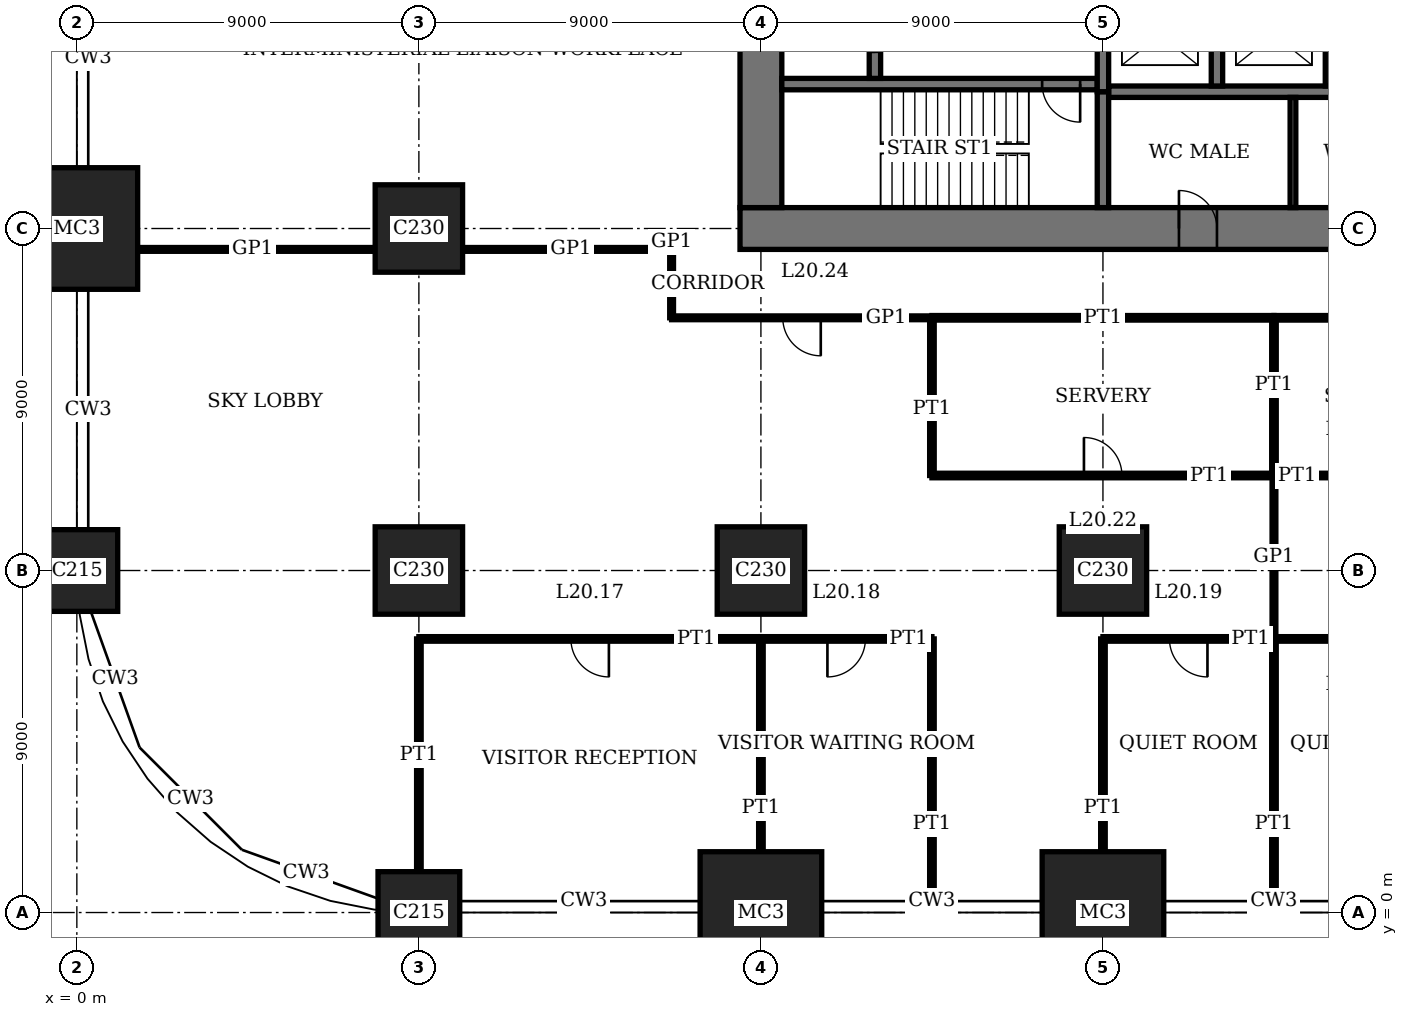
"""IFC4 building model, lengths in metres.
Left out: names, types, materials, properties, quantities, classifications, styles, units other than length and angle.
Written with IfcOpenShell. Run it as: python <this file> out.ifc"""

import sys

from ifc_helpers import new_model, si_unit, direction, frame, frame_2d, origin, origin_2d, place, context, subcontext, project, spatial, rectangle, extrude, element, fill, save


model = new_model("IFC4")
c1 = context("Model", 3, precision=1e-05, world=origin(), true_north=direction((0.0, 1.0)))
c2 = subcontext(c1, "Body", "Model", "MODEL_VIEW")
j1 = project(units=[si_unit("LENGTHUNIT", "METRE"), si_unit("PLANEANGLEUNIT", "RADIAN")], contexts=[c1])
p1 = place(None, origin())
s1 = spatial("IfcSite", under=j1, at=p1, CompositionType="ELEMENT")
p2 = place(p1, origin())
s2 = spatial("IfcBuilding", under=s1, at=p2, CompositionType="ELEMENT")
p3 = place(p2, frame((0.0, 0.0, 85.0)))
s3 = spatial("IfcBuildingStorey", under=s2, at=p3, CompositionType="ELEMENT", Elevation=85.0)
p4 = place(p3, frame((0.0, 9.0, 0.0), z_axis=(0.0, 0.0, 1.0), x_axis=(1.0, 0.0, 0.0)))
e1 = element("IfcColumn", 1, at=p4, inside=s3, PredefinedType="COLUMN", context=c2, shape_type="SweptSolid", body=[
    extrude(rectangle(XDim=2.15, YDim=2.15, at=origin_2d()), origin(), (0.0, 0.0, 1.0), 4.0),
])
p5 = place(p3, frame((0.0, 18.0, 0.0), z_axis=(0.0, 0.0, 1.0), x_axis=(1.0, 0.0, 0.0)))
e2 = element("IfcColumn", 2, at=p5, inside=s3, PredefinedType="COLUMN", context=c2, shape_type="SweptSolid", body=[
    extrude(rectangle(XDim=3.2, YDim=3.2, at=origin_2d()), origin(), (0.0, 0.0, 1.0), 4.0),
])
p6 = place(p3, frame((9.0, 0.0, 0.0), z_axis=(0.0, 0.0, 1.0), x_axis=(1.0, 0.0, 0.0)))
e3 = element("IfcColumn", 3, at=p6, inside=s3, PredefinedType="COLUMN", context=c2, shape_type="SweptSolid", body=[
    extrude(rectangle(XDim=2.15, YDim=2.15, at=origin_2d()), origin(), (0.0, 0.0, 1.0), 4.0),
])
for number, where, z_axis, x_axis in (
    (4, (9.0, 9.0, 0.0), (0.0, 0.0, 1.0), (1.0, 0.0, 0.0)),
    (5, (9.0, 18.0, 0.0), (0.0, 0.0, 1.0), (1.0, 0.0, 0.0)),
):
    element("IfcColumn", number, at=place(p3, frame(where, z_axis=z_axis, x_axis=x_axis)), inside=s3, PredefinedType="COLUMN", context=c2, shape_type="SweptSolid", body=[
        extrude(rectangle(XDim=2.3, YDim=2.3, at=origin_2d()), origin(), (0.0, 0.0, 1.0), 4.0),
    ])
p7 = place(p3, frame((18.0, 0.0, 0.0), z_axis=(0.0, 0.0, 1.0), x_axis=(1.0, 0.0, 0.0)))
e6 = element("IfcColumn", 6, at=p7, inside=s3, PredefinedType="COLUMN", context=c2, shape_type="SweptSolid", body=[
    extrude(rectangle(XDim=3.2, YDim=3.2, at=origin_2d()), origin(), (0.0, 0.0, 1.0), 4.0),
])
p8 = place(p3, frame((18.0, 9.0, 0.0), z_axis=(0.0, 0.0, 1.0), x_axis=(1.0, 0.0, 0.0)))
e7 = element("IfcColumn", 7, at=p8, inside=s3, PredefinedType="COLUMN", context=c2, shape_type="SweptSolid", body=[
    extrude(rectangle(XDim=2.3, YDim=2.3, at=origin_2d()), origin(), (0.0, 0.0, 1.0), 4.0),
])
p9 = place(p3, frame((27.0, 0.0, 0.0), z_axis=(0.0, 0.0, 1.0), x_axis=(1.0, 0.0, 0.0)))
e8 = element("IfcColumn", 8, at=p9, inside=s3, PredefinedType="COLUMN", context=c2, shape_type="SweptSolid", body=[
    extrude(rectangle(XDim=3.2, YDim=3.2, at=origin_2d()), origin(), (0.0, 0.0, 1.0), 4.0),
])
p10 = place(p3, frame((27.0, 9.0, 0.0), z_axis=(0.0, 0.0, 1.0), x_axis=(1.0, 0.0, 0.0)))
e9 = element("IfcColumn", 9, at=p10, inside=s3, PredefinedType="COLUMN", context=c2, shape_type="SweptSolid", body=[
    extrude(rectangle(XDim=2.3, YDim=2.3, at=origin_2d()), origin(), (0.0, 0.0, 1.0), 4.0),
])
p11 = place(p3, frame((17.45, 18.0, 0.0), z_axis=(0.0, 0.0, 1.0), x_axis=(1.0, 0.0, 0.0)))
e10 = element("IfcWall", 10, at=p11, inside=s3, PredefinedType="SHEAR", context=c2, shape_type="SweptSolid", body=[
    extrude(rectangle(XDim=28.1, YDim=1.1, at=frame_2d((14.05, 0.0))), origin(), (0.0, 0.0, 1.0), 4.0),
])
p12 = place(p11, frame((11.55, 0.0, 0.0)))
e11 = element("IfcOpeningElement", 11, at=p12, cuts=e10, PredefinedType="OPENING", context=c2, shape_type="SweptSolid", body=[
    extrude(rectangle(XDim=1.0, YDim=2.4, at=frame_2d((0.5, 1.2))), frame((0.0, 0.56, 0.0), z_axis=(0.0, -1.0, 0.0), x_axis=(1.0, 0.0, 0.0)), (0.0, 0.0, 1.0), 1.12),
])
p13 = place(p11, frame((16.55, 0.0, 0.0)))
e12 = element("IfcOpeningElement", 12, at=p13, cuts=e10, PredefinedType="OPENING", context=c2, shape_type="SweptSolid", body=[
    extrude(rectangle(XDim=1.0, YDim=2.4, at=frame_2d((0.5, 1.2))), frame((0.0, 0.56, 0.0), z_axis=(0.0, -1.0, 0.0), x_axis=(1.0, 0.0, 0.0)), (0.0, 0.0, 1.0), 1.12),
])
p14 = place(p11, frame((20.0, 0.0, 0.0)))
e13 = element("IfcOpeningElement", 13, at=p14, cuts=e10, PredefinedType="OPENING", context=c2, shape_type="SweptSolid", body=[
    extrude(rectangle(XDim=1.1, YDim=2.4, at=frame_2d((0.55, 1.2))), frame((0.0, 0.56, 0.0), z_axis=(0.0, -1.0, 0.0), x_axis=(1.0, 0.0, 0.0)), (0.0, 0.0, 1.0), 1.12),
])
p15 = place(p11, frame((24.05, 0.0, 0.0)))
e14 = element("IfcOpeningElement", 14, at=p15, cuts=e10, PredefinedType="OPENING", context=c2, shape_type="SweptSolid", body=[
    extrude(rectangle(XDim=1.0, YDim=2.4, at=frame_2d((0.5, 1.2))), frame((0.0, 0.56, 0.0), z_axis=(0.0, -1.0, 0.0), x_axis=(1.0, 0.0, 0.0)), (0.0, 0.0, 1.0), 1.12),
])
p16 = place(p3, frame((18.0, 35.45, 0.0), z_axis=(0.0, 0.0, 1.0), x_axis=(0.0, -1.0, 0.0)))
e15 = element("IfcWall", 15, at=p16, inside=s3, PredefinedType="SHEAR", context=c2, shape_type="SweptSolid", body=[
    extrude(rectangle(XDim=16.9, YDim=1.1, at=frame_2d((8.45, 0.0))), origin(), (0.0, 0.0, 1.0), 4.0),
])
p17 = place(p16, frame((8.9, 0.0, 0.0)))
e16 = element("IfcOpeningElement", 16, at=p17, cuts=e15, PredefinedType="OPENING", context=c2, shape_type="SweptSolid", body=[
    extrude(rectangle(XDim=1.8, YDim=2.4, at=frame_2d((0.9, 1.2))), frame((0.0, 0.56, 0.0), z_axis=(0.0, -1.0, 0.0), x_axis=(1.0, 0.0, 0.0)), (0.0, 0.0, 1.0), 1.12),
])
p18 = place(p3, frame((18.55, 21.8, 0.0), z_axis=(0.0, 0.0, 1.0), x_axis=(1.0, 0.0, 0.0)))
e17 = element("IfcWall", 17, at=p18, inside=s3, PredefinedType="SHEAR", context=c2, shape_type="SweptSolid", body=[
    extrude(rectangle(XDim=8.3, YDim=0.3, at=frame_2d((4.15, 0.0))), origin(), (0.0, 0.0, 1.0), 4.0),
])
p19 = place(p18, frame((6.85, 0.0, 0.0)))
e18 = element("IfcOpeningElement", 18, at=p19, cuts=e17, PredefinedType="OPENING", context=c2, shape_type="SweptSolid", body=[
    extrude(rectangle(XDim=1.0, YDim=2.4, at=frame_2d((0.5, 1.2))), frame((0.0, 0.16, 0.0), z_axis=(0.0, -1.0, 0.0), x_axis=(1.0, 0.0, 0.0)), (0.0, 0.0, 1.0), 0.32),
])
p20 = place(p3, frame((27.0, 18.55, 0.0), z_axis=(0.0, 0.0, 1.0), x_axis=(0.0, 1.0, 0.0)))
e19 = element("IfcWall", 19, at=p20, inside=s3, PredefinedType="SHEAR", context=c2, shape_type="SweptSolid", body=[
    extrude(rectangle(XDim=3.05, YDim=0.3, at=frame_2d((1.525, 0.0))), origin(), (0.0, 0.0, 1.0), 4.0),
])
p21 = place(p3, frame((21.0, 21.95, 0.0), z_axis=(0.0, 0.0, 1.0), x_axis=(0.0, 1.0, 0.0)))
e20 = element("IfcWall", 20, at=p21, inside=s3, PredefinedType="SHEAR", context=c2, shape_type="SweptSolid", body=[
    extrude(rectangle(XDim=2.5, YDim=0.3, at=frame_2d((1.25, 0.0))), origin(), (0.0, 0.0, 1.0), 4.0),
])
p22 = place(p21, frame((0.7, 0.0, 0.0)))
e21 = element("IfcOpeningElement", 21, at=p22, cuts=e20, PredefinedType="OPENING", context=c2, shape_type="SweptSolid", body=[
    extrude(rectangle(XDim=1.1, YDim=2.4, at=frame_2d((0.55, 1.2))), frame((0.0, 0.16, 0.0), z_axis=(0.0, -1.0, 0.0), x_axis=(1.0, 0.0, 0.0)), (0.0, 0.0, 1.0), 0.32),
])
p23 = place(p3, frame((27.15, 21.6, 0.0), z_axis=(0.0, 0.0, 1.0), x_axis=(1.0, 0.0, 0.0)))
e22 = element("IfcWall", 22, at=p23, inside=s3, PredefinedType="SHEAR", context=c2, shape_type="SweptSolid", body=[
    extrude(rectangle(XDim=17.3, YDim=0.3, at=frame_2d((8.65, 0.0))), origin(), (0.0, 0.0, 1.0), 4.0),
])
for number, where, z_axis, x_axis in (
    (23, (30.0, 21.75, 0.0), (0.0, 0.0, 1.0), (0.0, 1.0, 0.0)),
    (24, (33.0, 21.75, 0.0), (0.0, 0.0, 1.0), (0.0, 1.0, 0.0)),
):
    element("IfcWall", number, at=place(p3, frame(where, z_axis=z_axis, x_axis=x_axis)), inside=s3, PredefinedType="SHEAR", context=c2, shape_type="SweptSolid", body=[
        extrude(rectangle(XDim=2.7, YDim=0.3, at=frame_2d((1.35, 0.0))), origin(), (0.0, 0.0, 1.0), 4.0),
    ])
p24 = place(p3, frame((27.0, 21.6, 0.0), z_axis=(0.0, 0.0, 1.0), x_axis=(0.0, 1.0, 0.0)))
e25 = element("IfcWall", 25, at=p24, inside=s3, PredefinedType="SHEAR", context=c2, shape_type="SweptSolid", body=[
    extrude(rectangle(XDim=2.85, YDim=0.3, at=frame_2d((1.425, 0.0))), origin(), (0.0, 0.0, 1.0), 4.0),
])
p25 = place(p3, frame((9.0, 7.2, 0.0), z_axis=(0.0, 0.0, 1.0), x_axis=(1.0, 0.0, 0.0)))
e26 = element("IfcWall", 26, at=p25, inside=s3, PredefinedType="PARTITIONING", context=c2, shape_type="SweptSolid", body=[
    extrude(rectangle(XDim=9.0, YDim=0.12, at=frame_2d((4.5, 0.0))), origin(), (0.0, 0.0, 1.0), 3.75),
])
p26 = place(p25, frame((4.0, 0.0, 0.0)))
e27 = element("IfcOpeningElement", 27, at=p26, cuts=e26, PredefinedType="OPENING", context=c2, shape_type="SweptSolid", body=[
    extrude(rectangle(XDim=1.0, YDim=2.4, at=frame_2d((0.5, 1.2))), frame((0.0, 0.07, 0.0), z_axis=(0.0, -1.0, 0.0), x_axis=(1.0, 0.0, 0.0)), (0.0, 0.0, 1.0), 0.14),
])
p27 = place(p3, frame((18.0, 7.2, 0.0), z_axis=(0.0, 0.0, 1.0), x_axis=(1.0, 0.0, 0.0)))
e28 = element("IfcWall", 28, at=p27, inside=s3, PredefinedType="PARTITIONING", context=c2, shape_type="SweptSolid", body=[
    extrude(rectangle(XDim=4.5, YDim=0.12, at=frame_2d((2.25, 0.0))), origin(), (0.0, 0.0, 1.0), 3.75),
])
p28 = place(p27, frame((1.75, 0.0, 0.0)))
e29 = element("IfcOpeningElement", 29, at=p28, cuts=e28, PredefinedType="OPENING", context=c2, shape_type="SweptSolid", body=[
    extrude(rectangle(XDim=1.0, YDim=2.4, at=frame_2d((0.5, 1.2))), frame((0.0, 0.07, 0.0), z_axis=(0.0, -1.0, 0.0), x_axis=(1.0, 0.0, 0.0)), (0.0, 0.0, 1.0), 0.14),
])
p29 = place(p3, frame((27.0, 7.2, 0.0), z_axis=(0.0, 0.0, 1.0), x_axis=(1.0, 0.0, 0.0)))
e30 = element("IfcWall", 30, at=p29, inside=s3, PredefinedType="PARTITIONING", context=c2, shape_type="SweptSolid", body=[
    extrude(rectangle(XDim=4.5, YDim=0.12, at=frame_2d((2.25, 0.0))), origin(), (0.0, 0.0, 1.0), 3.75),
])
p30 = place(p29, frame((1.75, 0.0, 0.0)))
e31 = element("IfcOpeningElement", 31, at=p30, cuts=e30, PredefinedType="OPENING", context=c2, shape_type="SweptSolid", body=[
    extrude(rectangle(XDim=1.0, YDim=2.4, at=frame_2d((0.5, 1.2))), frame((0.0, 0.07, 0.0), z_axis=(0.0, -1.0, 0.0), x_axis=(1.0, 0.0, 0.0)), (0.0, 0.0, 1.0), 0.14),
])
p31 = place(p3, frame((31.5, 7.2, 0.0), z_axis=(0.0, 0.0, 1.0), x_axis=(1.0, 0.0, 0.0)))
e32 = element("IfcWall", 32, at=p31, inside=s3, PredefinedType="PARTITIONING", context=c2, shape_type="SweptSolid", body=[
    extrude(rectangle(XDim=4.5, YDim=0.12, at=frame_2d((2.25, 0.0))), origin(), (0.0, 0.0, 1.0), 3.75),
])
p32 = place(p31, frame((1.75, 0.0, 0.0)))
e33 = element("IfcOpeningElement", 33, at=p32, cuts=e32, PredefinedType="OPENING", context=c2, shape_type="SweptSolid", body=[
    extrude(rectangle(XDim=1.0, YDim=2.4, at=frame_2d((0.5, 1.2))), frame((0.0, 0.07, 0.0), z_axis=(0.0, -1.0, 0.0), x_axis=(1.0, 0.0, 0.0)), (0.0, 0.0, 1.0), 0.14),
])
p33 = place(p3, frame((22.5, 11.5, 0.0), z_axis=(0.0, 0.0, 1.0), x_axis=(1.0, 0.0, 0.0)))
e34 = element("IfcWall", 34, at=p33, inside=s3, PredefinedType="PARTITIONING", context=c2, shape_type="SweptSolid", body=[
    extrude(rectangle(XDim=9.0, YDim=0.12, at=frame_2d((4.5, 0.0))), origin(), (0.0, 0.0, 1.0), 3.75),
])
p34 = place(p33, frame((4.0, 0.0, 0.0)))
e35 = element("IfcOpeningElement", 35, at=p34, cuts=e34, PredefinedType="OPENING", context=c2, shape_type="SweptSolid", body=[
    extrude(rectangle(XDim=1.0, YDim=2.4, at=frame_2d((0.5, 1.2))), frame((0.0, 0.07, 0.0), z_axis=(0.0, -1.0, 0.0), x_axis=(1.0, 0.0, 0.0)), (0.0, 0.0, 1.0), 0.14),
])
p35 = place(p3, frame((31.5, 11.5, 0.0), z_axis=(0.0, 0.0, 1.0), x_axis=(1.0, 0.0, 0.0)))
e36 = element("IfcWall", 36, at=p35, inside=s3, PredefinedType="PARTITIONING", context=c2, shape_type="SweptSolid", body=[
    extrude(rectangle(XDim=4.5, YDim=0.12, at=frame_2d((2.25, 0.0))), origin(), (0.0, 0.0, 1.0), 3.75),
])
p36 = place(p35, frame((1.75, 0.0, 0.0)))
e37 = element("IfcOpeningElement", 37, at=p36, cuts=e36, PredefinedType="OPENING", context=c2, shape_type="SweptSolid", body=[
    extrude(rectangle(XDim=1.0, YDim=2.4, at=frame_2d((0.5, 1.2))), frame((0.0, 0.07, 0.0), z_axis=(0.0, -1.0, 0.0), x_axis=(1.0, 0.0, 0.0)), (0.0, 0.0, 1.0), 0.14),
])
p37 = place(p3, frame((22.5, 15.65, 0.0), z_axis=(0.0, 0.0, 1.0), x_axis=(1.0, 0.0, 0.0)))
e38 = element("IfcWall", 38, at=p37, inside=s3, PredefinedType="PARTITIONING", context=c2, shape_type="SweptSolid", body=[
    extrude(rectangle(XDim=9.0, YDim=0.12, at=frame_2d((4.5, 0.0))), origin(), (0.0, 0.0, 1.0), 3.75),
])
p38 = place(p3, frame((31.5, 15.65, 0.0), z_axis=(0.0, 0.0, 1.0), x_axis=(1.0, 0.0, 0.0)))
e39 = element("IfcWall", 39, at=p38, inside=s3, PredefinedType="PARTITIONING", context=c2, shape_type="SweptSolid", body=[
    extrude(rectangle(XDim=4.5, YDim=0.12, at=frame_2d((2.25, 0.0))), origin(), (0.0, 0.0, 1.0), 3.75),
])
p39 = place(p3, frame((15.65, 15.65, 0.0), z_axis=(0.0, 0.0, 1.0), x_axis=(1.0, 0.0, 0.0)))
e40 = element("IfcWall", 40, at=p39, inside=s3, PredefinedType="PARTITIONING", context=c2, shape_type="SweptSolid", body=[
    extrude(rectangle(XDim=6.85, YDim=0.1, at=frame_2d((3.425, 0.0))), origin(), (0.0, 0.0, 1.0), 3.75),
])
p40 = place(p39, frame((2.925, 0.0, 0.0)))
e41 = element("IfcOpeningElement", 41, at=p40, cuts=e40, PredefinedType="OPENING", context=c2, shape_type="SweptSolid", body=[
    extrude(rectangle(XDim=1.0, YDim=2.4, at=frame_2d((0.5, 1.2))), frame((0.0, 0.06, 0.0), z_axis=(0.0, -1.0, 0.0), x_axis=(1.0, 0.0, 0.0)), (0.0, 0.0, 1.0), 0.12),
])
p41 = place(p3, frame((1.6, 17.45, 0.0), z_axis=(0.0, 0.0, 1.0), x_axis=(1.0, 0.0, 0.0)))
e42 = element("IfcWall", 42, at=p41, inside=s3, PredefinedType="PARTITIONING", context=c2, shape_type="SweptSolid", body=[
    extrude(rectangle(XDim=6.25, YDim=0.1, at=frame_2d((3.125, 0.0))), origin(), (0.0, 0.0, 1.0), 3.75),
])
p42 = place(p3, frame((10.15, 17.45, 0.0), z_axis=(0.0, 0.0, 1.0), x_axis=(1.0, 0.0, 0.0)))
e43 = element("IfcWall", 43, at=p42, inside=s3, PredefinedType="PARTITIONING", context=c2, shape_type="SweptSolid", body=[
    extrude(rectangle(XDim=5.5, YDim=0.1, at=frame_2d((2.75, 0.0))), origin(), (0.0, 0.0, 1.0), 3.75),
])
p43 = place(p3, frame((9.0, 1.075, 0.0), z_axis=(0.0, 0.0, 1.0), x_axis=(0.0, 1.0, 0.0)))
e44 = element("IfcWall", 44, at=p43, inside=s3, PredefinedType="PARTITIONING", context=c2, shape_type="SweptSolid", body=[
    extrude(rectangle(XDim=6.125, YDim=0.12, at=frame_2d((3.062, 0.0))), origin(), (0.0, 0.0, 1.0), 3.05),
])
p44 = place(p3, frame((15.65, 15.65, 0.0), z_axis=(0.0, 0.0, 1.0), x_axis=(0.0, 1.0, 0.0)))
e45 = element("IfcWall", 45, at=p44, inside=s3, PredefinedType="PARTITIONING", context=c2, shape_type="SweptSolid", body=[
    extrude(rectangle(XDim=1.8, YDim=0.1, at=frame_2d((0.9, 0.0))), origin(), (0.0, 0.0, 1.0), 3.75),
])
p45 = place(p3, frame((18.0, 1.6, 0.0), z_axis=(0.0, 0.0, 1.0), x_axis=(0.0, 1.0, 0.0)))
e46 = element("IfcWall", 46, at=p45, inside=s3, PredefinedType="PARTITIONING", context=c2, shape_type="SweptSolid", body=[
    extrude(rectangle(XDim=5.6, YDim=0.12, at=frame_2d((2.8, 0.0))), origin(), (0.0, 0.0, 1.0), 3.05),
])
p46 = place(p3, frame((22.5, 11.5, 0.0), z_axis=(0.0, 0.0, 1.0), x_axis=(0.0, 1.0, 0.0)))
e47 = element("IfcWall", 47, at=p46, inside=s3, PredefinedType="PARTITIONING", context=c2, shape_type="SweptSolid", body=[
    extrude(rectangle(XDim=4.15, YDim=0.12, at=frame_2d((2.075, 0.0))), origin(), (0.0, 0.0, 1.0), 3.75),
])
p47 = place(p3, frame((22.5, 0.31, 0.0), z_axis=(0.0, 0.0, 1.0), x_axis=(0.0, 1.0, 0.0)))
e48 = element("IfcWall", 48, at=p47, inside=s3, PredefinedType="PARTITIONING", context=c2, shape_type="SweptSolid", body=[
    extrude(rectangle(XDim=6.89, YDim=0.12, at=frame_2d((3.445, 0.0))), origin(), (0.0, 0.0, 1.0), 3.75),
])
p48 = place(p3, frame((27.0, 1.6, 0.0), z_axis=(0.0, 0.0, 1.0), x_axis=(0.0, 1.0, 0.0)))
e49 = element("IfcWall", 49, at=p48, inside=s3, PredefinedType="PARTITIONING", context=c2, shape_type="SweptSolid", body=[
    extrude(rectangle(XDim=5.6, YDim=0.12, at=frame_2d((2.8, 0.0))), origin(), (0.0, 0.0, 1.0), 3.05),
])
p49 = place(p3, frame((31.5, 11.5, 0.0), z_axis=(0.0, 0.0, 1.0), x_axis=(0.0, 1.0, 0.0)))
e50 = element("IfcWall", 50, at=p49, inside=s3, PredefinedType="PARTITIONING", context=c2, shape_type="SweptSolid", body=[
    extrude(rectangle(XDim=4.15, YDim=0.12, at=frame_2d((2.075, 0.0))), origin(), (0.0, 0.0, 1.0), 3.75),
])
p50 = place(p3, frame((31.5, 0.31, 0.0), z_axis=(0.0, 0.0, 1.0), x_axis=(0.0, 1.0, 0.0)))
e51 = element("IfcWall", 51, at=p50, inside=s3, PredefinedType="PARTITIONING", context=c2, shape_type="SweptSolid", body=[
    extrude(rectangle(XDim=6.89, YDim=0.12, at=frame_2d((3.445, 0.0))), origin(), (0.0, 0.0, 1.0), 3.75),
])
p51 = place(p3, frame((31.5, 7.2, 0.0), z_axis=(0.0, 0.0, 1.0), x_axis=(0.0, 1.0, 0.0)))
e52 = element("IfcWall", 52, at=p51, inside=s3, PredefinedType="PARTITIONING", context=c2, shape_type="SweptSolid", body=[
    extrude(rectangle(XDim=4.3, YDim=0.1, at=frame_2d((2.15, 0.0))), origin(), (0.0, 0.0, 1.0), 3.75),
])
p52 = place(p3, frame((32.0, 18.55, 0.0), z_axis=(0.0, 0.0, 1.0), x_axis=(0.0, 1.0, 0.0)))
e53 = element("IfcWall", 53, at=p52, inside=s3, PredefinedType="PARTITIONING", context=c2, shape_type="SweptSolid", body=[
    extrude(rectangle(XDim=2.9, YDim=0.15, at=frame_2d((1.45, 0.0))), origin(), (0.0, 0.0, 1.0), 3.75),
])
p53 = place(p12, origin())
e54 = element("IfcDoor", 54, at=p53, inside=s3, OperationType="SINGLE_SWING_RIGHT", PredefinedType="DOOR", context=c2, shape_type="SweptSolid", body=[
    extrude(rectangle(XDim=1.0, YDim=2.4, at=frame_2d((0.5, 1.2))), frame((0.0, 0.025, 0.0), z_axis=(0.0, -1.0, 0.0), x_axis=(1.0, 0.0, 0.0)), (0.0, 0.0, 1.0), 0.05),
    extrude(rectangle(XDim=0.04, YDim=2.4, at=frame_2d((0.02, 1.2))), frame((0.0, 0.4, 0.0), z_axis=(0.0, -1.0, 0.0), x_axis=(1.0, 0.0, 0.0)), (0.0, 0.0, 1.0), 0.8),
    extrude(rectangle(XDim=0.04, YDim=2.4, at=frame_2d((0.98, 1.2))), frame((0.0, 0.4, 0.0), z_axis=(0.0, -1.0, 0.0), x_axis=(1.0, 0.0, 0.0)), (0.0, 0.0, 1.0), 0.8),
    extrude(rectangle(XDim=1.0, YDim=0.04, at=frame_2d((0.5, 2.38))), frame((0.0, 0.4, 0.0), z_axis=(0.0, -1.0, 0.0), x_axis=(1.0, 0.0, 0.0)), (0.0, 0.0, 1.0), 0.8),
])
fill(e11, e54)
p54 = place(p19, origin())
e55 = element("IfcDoor", 55, at=p54, inside=s3, OperationType="SINGLE_SWING_RIGHT", PredefinedType="DOOR", context=c2, shape_type="SweptSolid", body=[
    extrude(rectangle(XDim=1.0, YDim=2.4, at=frame_2d((0.5, 1.2))), frame((0.0, 0.03, 0.0), z_axis=(0.0, -1.0, 0.0), x_axis=(1.0, 0.0, 0.0)), (0.0, 0.0, 1.0), 0.06),
])
fill(e18, e55)
p55 = place(p26, origin())
e56 = element("IfcDoor", 56, at=p55, inside=s3, OperationType="SINGLE_SWING_RIGHT", PredefinedType="DOOR", context=c2, shape_type="SweptSolid", body=[
    extrude(rectangle(XDim=1.0, YDim=2.4, at=frame_2d((0.5, 1.2))), frame((0.0, 0.025, 0.0), z_axis=(0.0, -1.0, 0.0), x_axis=(1.0, 0.0, 0.0)), (0.0, 0.0, 1.0), 0.05),
])
fill(e27, e56)
p56 = place(p28, origin())
e57 = element("IfcDoor", 57, at=p56, inside=s3, OperationType="SINGLE_SWING_LEFT", PredefinedType="DOOR", context=c2, shape_type="SweptSolid", body=[
    extrude(rectangle(XDim=1.0, YDim=2.4, at=frame_2d((0.5, 1.2))), frame((0.0, 0.025, 0.0), z_axis=(0.0, -1.0, 0.0), x_axis=(1.0, 0.0, 0.0)), (0.0, 0.0, 1.0), 0.05),
])
fill(e29, e57)
p57 = place(p30, origin())
e58 = element("IfcDoor", 58, at=p57, inside=s3, OperationType="SINGLE_SWING_RIGHT", PredefinedType="DOOR", context=c2, shape_type="SweptSolid", body=[
    extrude(rectangle(XDim=1.0, YDim=2.4, at=frame_2d((0.5, 1.2))), frame((0.0, 0.025, 0.0), z_axis=(0.0, -1.0, 0.0), x_axis=(1.0, 0.0, 0.0)), (0.0, 0.0, 1.0), 0.05),
])
fill(e31, e58)
p58 = place(p34, origin())
e59 = element("IfcDoor", 59, at=p58, inside=s3, OperationType="SINGLE_SWING_RIGHT", PredefinedType="DOOR", context=c2, shape_type="SweptSolid", body=[
    extrude(rectangle(XDim=1.0, YDim=2.4, at=frame_2d((0.5, 1.2))), frame((0.0, 0.025, 0.0), z_axis=(0.0, -1.0, 0.0), x_axis=(1.0, 0.0, 0.0)), (0.0, 0.0, 1.0), 0.05),
])
fill(e35, e59)
p59 = place(p40, origin())
e60 = element("IfcDoor", 60, at=p59, inside=s3, OperationType="SINGLE_SWING_RIGHT", PredefinedType="DOOR", context=c2, shape_type="SweptSolid", body=[
    extrude(rectangle(XDim=1.0, YDim=2.4, at=frame_2d((0.5, 1.2))), frame((0.0, 0.02, 0.0), z_axis=(0.0, -1.0, 0.0), x_axis=(1.0, 0.0, 0.0)), (0.0, 0.0, 1.0), 0.04),
])
fill(e41, e60)
save(model, sys.argv[1])
